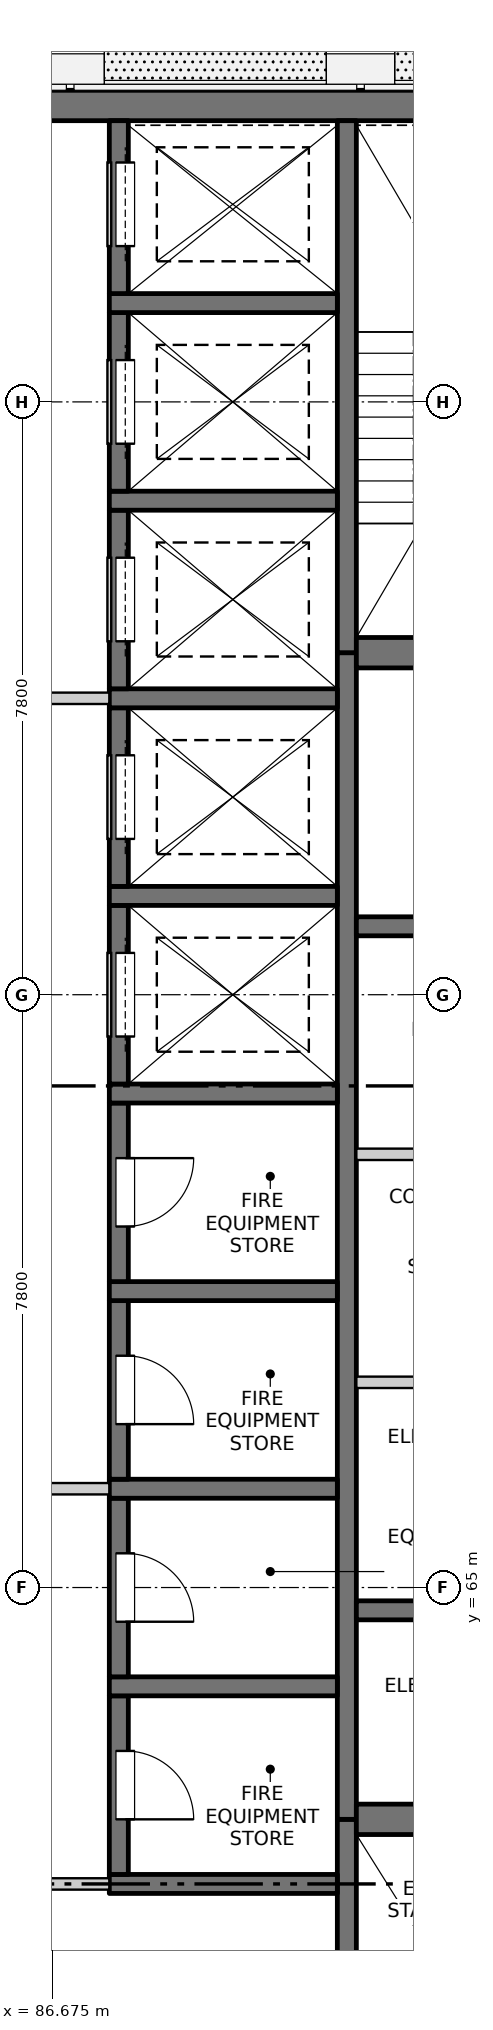
"""IFC4 building model, lengths in metres.
Left out: names, types, materials, properties, quantities, classifications, styles, units other than length and angle.
Written with IfcOpenShell. Run it as: python <this file> out.ifc"""

import sys

from ifc_helpers import new_model, si_unit, direction, frame, frame_2d, origin, place, context, subcontext, project, spatial, rectangle, extrude, element, fill, save


model = new_model("IFC4")
c1 = context("Model", 3, precision=1e-05, world=origin(), true_north=direction((0.0, 1.0)))
c2 = subcontext(c1, "Body", "Model", "MODEL_VIEW")
j1 = project(units=[si_unit("LENGTHUNIT", "METRE"), si_unit("PLANEANGLEUNIT", "RADIAN")], contexts=[c1])
p1 = place(None, origin())
s1 = spatial("IfcSite", under=j1, at=p1, CompositionType="ELEMENT")
p2 = place(p1, origin())
s2 = spatial("IfcBuilding", under=s1, at=p2, CompositionType="ELEMENT")
p3 = place(p2, frame((0.0, 0.0, 252.8)))
s3 = spatial("IfcBuildingStorey", under=s2, at=p3, CompositionType="ELEMENT", Elevation=252.8)
p4 = place(p3, frame((75.45, 84.5, -0.25), z_axis=(0.0, 0.0, 1.0), x_axis=(1.0, 0.0, 0.0)))
e1 = element("IfcWall", 1, at=p4, inside=s3, PredefinedType="SOLIDWALL", context=c2, shape_type="SweptSolid", body=[
    extrude(rectangle(XDim=19.1, YDim=0.4, at=frame_2d((9.55, 0.0))), origin(), (0.0, 0.0, 1.0), 3.4),
])
p5 = place(p3, frame((90.55, 55.45, -0.25), z_axis=(0.0, 0.0, 1.0), x_axis=(0.0, 1.0, 0.0)))
e2 = element("IfcWall", 2, at=p5, inside=s3, PredefinedType="SOLIDWALL", context=c2, shape_type="SweptSolid", body=[
    extrude(rectangle(XDim=6.5, YDim=0.25, at=frame_2d((3.25, 0.0))), origin(), (0.0, 0.0, 1.0), 3.4),
])
p6 = place(p5, frame((0.2, 0.0, 0.25)))
e3 = element("IfcOpeningElement", 3, at=p6, cuts=e2, PredefinedType="OPENING", context=c2, shape_type="SweptSolid", body=[
    extrude(rectangle(XDim=1.2, YDim=2.1, at=frame_2d((0.6, 1.05))), frame((0.0, 0.135, 0.0), z_axis=(0.0, -1.0, 0.0), x_axis=(1.0, 0.0, 0.0)), (0.0, 0.0, 1.0), 0.27),
])
p7 = place(p3, frame((90.55, 61.95, -0.25), z_axis=(0.0, 0.0, 1.0), x_axis=(0.0, 1.0, 0.0)))
e4 = element("IfcWall", 4, at=p7, inside=s3, PredefinedType="SOLIDWALL", context=c2, shape_type="SweptSolid", body=[
    extrude(rectangle(XDim=15.35, YDim=0.25, at=frame_2d((7.675, 0.0))), origin(), (0.0, 0.0, 1.0), 3.4),
])
p8 = place(p3, frame((90.55, 77.3, -0.25), z_axis=(0.0, 0.0, 1.0), x_axis=(0.0, 1.0, 0.0)))
e5 = element("IfcWall", 5, at=p8, inside=s3, PredefinedType="SOLIDWALL", context=c2, shape_type="SweptSolid", body=[
    extrude(rectangle(XDim=7.0, YDim=0.25, at=frame_2d((3.5, 0.0))), origin(), (0.0, 0.0, 1.0), 3.4),
])
p9 = place(p3, frame((87.425, 61.1, -0.25), z_axis=(0.0, 0.0, 1.0), x_axis=(1.0, 0.0, 0.0)))
e6 = element("IfcWall", 6, at=p9, inside=s3, PredefinedType="SOLIDWALL", context=c2, shape_type="SweptSolid", body=[
    extrude(rectangle(XDim=3.0, YDim=0.25, at=frame_2d((1.5, 0.0))), origin(), (0.0, 0.0, 1.0), 3.4),
])
p10 = place(p3, frame((87.55, 61.225, -0.25), z_axis=(0.0, 0.0, 1.0), x_axis=(0.0, 1.0, 0.0)))
e7 = element("IfcWall", 7, at=p10, inside=s3, PredefinedType="SOLIDWALL", context=c2, shape_type="SweptSolid", body=[
    extrude(rectangle(XDim=2.35, YDim=0.25, at=frame_2d((1.175, 0.0))), origin(), (0.0, 0.0, 1.0), 3.4),
])
p11 = place(p10, frame((0.725, 0.0, 0.25)))
e8 = element("IfcOpeningElement", 8, at=p11, cuts=e7, PredefinedType="OPENING", context=c2, shape_type="SweptSolid", body=[
    extrude(rectangle(XDim=0.9, YDim=2.1, at=frame_2d((0.45, 1.05))), frame((0.0, 0.135, 0.0), z_axis=(0.0, -1.0, 0.0), x_axis=(1.0, 0.0, 0.0)), (0.0, 0.0, 1.0), 0.27),
])
p12 = place(p3, frame((87.425, 63.7, -0.25), z_axis=(0.0, 0.0, 1.0), x_axis=(1.0, 0.0, 0.0)))
e9 = element("IfcWall", 9, at=p12, inside=s3, PredefinedType="SOLIDWALL", context=c2, shape_type="SweptSolid", body=[
    extrude(rectangle(XDim=3.0, YDim=0.25, at=frame_2d((1.5, 0.0))), origin(), (0.0, 0.0, 1.0), 3.4),
])
p13 = place(p3, frame((87.55, 63.825, -0.25), z_axis=(0.0, 0.0, 1.0), x_axis=(0.0, 1.0, 0.0)))
e10 = element("IfcWall", 10, at=p13, inside=s3, PredefinedType="SOLIDWALL", context=c2, shape_type="SweptSolid", body=[
    extrude(rectangle(XDim=2.35, YDim=0.25, at=frame_2d((1.175, 0.0))), origin(), (0.0, 0.0, 1.0), 3.4),
])
p14 = place(p13, frame((0.725, 0.0, 0.25)))
e11 = element("IfcOpeningElement", 11, at=p14, cuts=e10, PredefinedType="OPENING", context=c2, shape_type="SweptSolid", body=[
    extrude(rectangle(XDim=0.9, YDim=2.1, at=frame_2d((0.45, 1.05))), frame((0.0, 0.135, 0.0), z_axis=(0.0, -1.0, 0.0), x_axis=(1.0, 0.0, 0.0)), (0.0, 0.0, 1.0), 0.27),
])
p15 = place(p3, frame((87.425, 66.3, -0.25), z_axis=(0.0, 0.0, 1.0), x_axis=(1.0, 0.0, 0.0)))
e12 = element("IfcWall", 12, at=p15, inside=s3, PredefinedType="SOLIDWALL", context=c2, shape_type="SweptSolid", body=[
    extrude(rectangle(XDim=3.0, YDim=0.25, at=frame_2d((1.5, 0.0))), origin(), (0.0, 0.0, 1.0), 3.4),
])
p16 = place(p3, frame((87.55, 66.425, -0.25), z_axis=(0.0, 0.0, 1.0), x_axis=(0.0, 1.0, 0.0)))
e13 = element("IfcWall", 13, at=p16, inside=s3, PredefinedType="SOLIDWALL", context=c2, shape_type="SweptSolid", body=[
    extrude(rectangle(XDim=2.35, YDim=0.25, at=frame_2d((1.175, 0.0))), origin(), (0.0, 0.0, 1.0), 3.4),
])
p17 = place(p16, frame((0.725, 0.0, 0.25)))
e14 = element("IfcOpeningElement", 14, at=p17, cuts=e13, PredefinedType="OPENING", context=c2, shape_type="SweptSolid", body=[
    extrude(rectangle(XDim=0.9, YDim=2.1, at=frame_2d((0.45, 1.05))), frame((0.0, 0.135, 0.0), z_axis=(0.0, -1.0, 0.0), x_axis=(1.0, 0.0, 0.0)), (0.0, 0.0, 1.0), 0.27),
])
p18 = place(p3, frame((87.425, 68.9, -0.25), z_axis=(0.0, 0.0, 1.0), x_axis=(1.0, 0.0, 0.0)))
e15 = element("IfcWall", 15, at=p18, inside=s3, PredefinedType="SOLIDWALL", context=c2, shape_type="SweptSolid", body=[
    extrude(rectangle(XDim=3.0, YDim=0.25, at=frame_2d((1.5, 0.0))), origin(), (0.0, 0.0, 1.0), 3.4),
])
p19 = place(p3, frame((87.55, 69.025, -0.25), z_axis=(0.0, 0.0, 1.0), x_axis=(0.0, 1.0, 0.0)))
e16 = element("IfcWall", 16, at=p19, inside=s3, PredefinedType="SOLIDWALL", context=c2, shape_type="SweptSolid", body=[
    extrude(rectangle(XDim=2.35, YDim=0.25, at=frame_2d((1.175, 0.0))), origin(), (0.0, 0.0, 1.0), 3.4),
])
p20 = place(p19, frame((0.725, 0.0, 0.25)))
e17 = element("IfcOpeningElement", 17, at=p20, cuts=e16, PredefinedType="OPENING", context=c2, shape_type="SweptSolid", body=[
    extrude(rectangle(XDim=0.9, YDim=2.1, at=frame_2d((0.45, 1.05))), frame((0.0, 0.135, 0.0), z_axis=(0.0, -1.0, 0.0), x_axis=(1.0, 0.0, 0.0)), (0.0, 0.0, 1.0), 0.27),
])
p21 = place(p3, frame((87.425, 71.5, -0.25), z_axis=(0.0, 0.0, 1.0), x_axis=(1.0, 0.0, 0.0)))
e18 = element("IfcWall", 18, at=p21, inside=s3, PredefinedType="SOLIDWALL", context=c2, shape_type="SweptSolid", body=[
    extrude(rectangle(XDim=3.0, YDim=0.25, at=frame_2d((1.5, 0.0))), origin(), (0.0, 0.0, 1.0), 3.4),
])
p22 = place(p3, frame((87.55, 71.625, -0.25), z_axis=(0.0, 0.0, 1.0), x_axis=(0.0, 1.0, 0.0)))
e19 = element("IfcWall", 19, at=p22, inside=s3, PredefinedType="SOLIDWALL", context=c2, shape_type="SweptSolid", body=[
    extrude(rectangle(XDim=2.35, YDim=0.25, at=frame_2d((1.175, 0.0))), origin(), (0.0, 0.0, 1.0), 3.4),
])
p23 = place(p22, frame((0.625, 0.0, 0.25)))
e20 = element("IfcOpeningElement", 20, at=p23, cuts=e19, PredefinedType="OPENING", context=c2, shape_type="SweptSolid", body=[
    extrude(rectangle(XDim=1.1, YDim=2.1, at=frame_2d((0.55, 1.05))), frame((0.0, 0.135, 0.0), z_axis=(0.0, -1.0, 0.0), x_axis=(1.0, 0.0, 0.0)), (0.0, 0.0, 1.0), 0.27),
])
p24 = place(p3, frame((87.425, 74.1, -0.25), z_axis=(0.0, 0.0, 1.0), x_axis=(1.0, 0.0, 0.0)))
e21 = element("IfcWall", 21, at=p24, inside=s3, PredefinedType="SOLIDWALL", context=c2, shape_type="SweptSolid", body=[
    extrude(rectangle(XDim=3.0, YDim=0.25, at=frame_2d((1.5, 0.0))), origin(), (0.0, 0.0, 1.0), 3.4),
])
p25 = place(p3, frame((87.55, 74.225, -0.25), z_axis=(0.0, 0.0, 1.0), x_axis=(0.0, 1.0, 0.0)))
e22 = element("IfcWall", 22, at=p25, inside=s3, PredefinedType="SOLIDWALL", context=c2, shape_type="SweptSolid", body=[
    extrude(rectangle(XDim=2.35, YDim=0.25, at=frame_2d((1.175, 0.0))), origin(), (0.0, 0.0, 1.0), 3.4),
])
p26 = place(p25, frame((0.625, 0.0, 0.25)))
e23 = element("IfcOpeningElement", 23, at=p26, cuts=e22, PredefinedType="OPENING", context=c2, shape_type="SweptSolid", body=[
    extrude(rectangle(XDim=1.1, YDim=2.1, at=frame_2d((0.55, 1.05))), frame((0.0, 0.135, 0.0), z_axis=(0.0, -1.0, 0.0), x_axis=(1.0, 0.0, 0.0)), (0.0, 0.0, 1.0), 0.27),
])
p27 = place(p3, frame((87.425, 76.7, -0.25), z_axis=(0.0, 0.0, 1.0), x_axis=(1.0, 0.0, 0.0)))
e24 = element("IfcWall", 24, at=p27, inside=s3, PredefinedType="SOLIDWALL", context=c2, shape_type="SweptSolid", body=[
    extrude(rectangle(XDim=3.0, YDim=0.25, at=frame_2d((1.5, 0.0))), origin(), (0.0, 0.0, 1.0), 3.4),
])
p28 = place(p3, frame((87.55, 76.825, -0.25), z_axis=(0.0, 0.0, 1.0), x_axis=(0.0, 1.0, 0.0)))
e25 = element("IfcWall", 25, at=p28, inside=s3, PredefinedType="SOLIDWALL", context=c2, shape_type="SweptSolid", body=[
    extrude(rectangle(XDim=2.35, YDim=0.25, at=frame_2d((1.175, 0.0))), origin(), (0.0, 0.0, 1.0), 3.4),
])
p29 = place(p28, frame((0.625, 0.0, 0.25)))
e26 = element("IfcOpeningElement", 26, at=p29, cuts=e25, PredefinedType="OPENING", context=c2, shape_type="SweptSolid", body=[
    extrude(rectangle(XDim=1.1, YDim=2.1, at=frame_2d((0.55, 1.05))), frame((0.0, 0.135, 0.0), z_axis=(0.0, -1.0, 0.0), x_axis=(1.0, 0.0, 0.0)), (0.0, 0.0, 1.0), 0.27),
])
p30 = place(p3, frame((87.425, 79.3, -0.25), z_axis=(0.0, 0.0, 1.0), x_axis=(1.0, 0.0, 0.0)))
e27 = element("IfcWall", 27, at=p30, inside=s3, PredefinedType="SOLIDWALL", context=c2, shape_type="SweptSolid", body=[
    extrude(rectangle(XDim=3.0, YDim=0.25, at=frame_2d((1.5, 0.0))), origin(), (0.0, 0.0, 1.0), 3.4),
])
p31 = place(p3, frame((87.55, 79.425, -0.25), z_axis=(0.0, 0.0, 1.0), x_axis=(0.0, 1.0, 0.0)))
e28 = element("IfcWall", 28, at=p31, inside=s3, PredefinedType="SOLIDWALL", context=c2, shape_type="SweptSolid", body=[
    extrude(rectangle(XDim=2.35, YDim=0.25, at=frame_2d((1.175, 0.0))), origin(), (0.0, 0.0, 1.0), 3.4),
])
p32 = place(p31, frame((0.625, 0.0, 0.25)))
e29 = element("IfcOpeningElement", 29, at=p32, cuts=e28, PredefinedType="OPENING", context=c2, shape_type="SweptSolid", body=[
    extrude(rectangle(XDim=1.1, YDim=2.1, at=frame_2d((0.55, 1.05))), frame((0.0, 0.135, 0.0), z_axis=(0.0, -1.0, 0.0), x_axis=(1.0, 0.0, 0.0)), (0.0, 0.0, 1.0), 0.27),
])
p33 = place(p3, frame((87.425, 81.9, -0.25), z_axis=(0.0, 0.0, 1.0), x_axis=(1.0, 0.0, 0.0)))
e30 = element("IfcWall", 30, at=p33, inside=s3, PredefinedType="SOLIDWALL", context=c2, shape_type="SweptSolid", body=[
    extrude(rectangle(XDim=3.0, YDim=0.25, at=frame_2d((1.5, 0.0))), origin(), (0.0, 0.0, 1.0), 3.4),
])
p34 = place(p3, frame((87.55, 82.025, -0.25), z_axis=(0.0, 0.0, 1.0), x_axis=(0.0, 1.0, 0.0)))
e31 = element("IfcWall", 31, at=p34, inside=s3, PredefinedType="SOLIDWALL", context=c2, shape_type="SweptSolid", body=[
    extrude(rectangle(XDim=2.275, YDim=0.25, at=frame_2d((1.138, 0.0))), origin(), (0.0, 0.0, 1.0), 3.4),
])
p35 = place(p34, frame((0.625, 0.0, 0.25)))
e32 = element("IfcOpeningElement", 32, at=p35, cuts=e31, PredefinedType="OPENING", context=c2, shape_type="SweptSolid", body=[
    extrude(rectangle(XDim=1.1, YDim=2.1, at=frame_2d((0.55, 1.05))), frame((0.0, 0.135, 0.0), z_axis=(0.0, -1.0, 0.0), x_axis=(1.0, 0.0, 0.0)), (0.0, 0.0, 1.0), 0.27),
])
p36 = place(p3, frame((90.675, 61.95, -0.25), z_axis=(0.0, 0.0, 1.0), x_axis=(1.0, 0.0, 0.0)))
e33 = element("IfcWall", 33, at=p36, inside=s3, PredefinedType="SOLIDWALL", context=c2, shape_type="SweptSolid", body=[
    extrude(rectangle(XDim=3.875, YDim=0.4, at=frame_2d((1.938, 0.0))), origin(), (0.0, 0.0, 1.0), 3.4),
])
for number, where, z_axis, x_axis in (
    (34, (90.675, 64.7, -0.25), (0.0, 0.0, 1.0), (1.0, 0.0, 0.0)),
    (35, (90.675, 73.7, -0.25), (0.0, 0.0, 1.0), (1.0, 0.0, 0.0)),
):
    element("IfcWall", number, at=place(p3, frame(where, z_axis=z_axis, x_axis=x_axis)), inside=s3, PredefinedType="SOLIDWALL", context=c2, shape_type="SweptSolid", body=[
        extrude(rectangle(XDim=3.875, YDim=0.25, at=frame_2d((1.938, 0.0))), origin(), (0.0, 0.0, 1.0), 3.4),
    ])
p37 = place(p3, frame((90.675, 77.3, -0.25), z_axis=(0.0, 0.0, 1.0), x_axis=(1.0, 0.0, 0.0)))
e36 = element("IfcWall", 36, at=p37, inside=s3, PredefinedType="SOLIDWALL", context=c2, shape_type="SweptSolid", body=[
    extrude(rectangle(XDim=3.875, YDim=0.4, at=frame_2d((1.938, 0.0))), origin(), (0.0, 0.0, 1.0), 3.4),
])
p38 = place(p3, frame((82.575, 61.1, 0.0), z_axis=(0.0, 0.0, 1.0), x_axis=(1.0, 0.0, 0.0)))
e37 = element("IfcWall", 37, at=p38, inside=s3, PredefinedType="PARTITIONING", context=c2, shape_type="SweptSolid", body=[
    extrude(rectangle(XDim=4.85, YDim=0.15, at=frame_2d((2.425, 0.0))), origin(), (0.0, 0.0, 1.0), 3.15),
])
p39 = place(p38, frame((1.525, 0.0, 0.0)))
e38 = element("IfcOpeningElement", 38, at=p39, cuts=e37, PredefinedType="OPENING", context=c2, shape_type="SweptSolid", body=[
    extrude(rectangle(XDim=1.8, YDim=2.1, at=frame_2d((0.9, 1.05))), frame((0.0, 0.085, 0.0), z_axis=(0.0, -1.0, 0.0), x_axis=(1.0, 0.0, 0.0)), (0.0, 0.0, 1.0), 0.17),
])
p40 = place(p3, frame((82.575, 66.3, 0.0), z_axis=(0.0, 0.0, 1.0), x_axis=(1.0, 0.0, 0.0)))
e39 = element("IfcWall", 39, at=p40, inside=s3, PredefinedType="PARTITIONING", context=c2, shape_type="SweptSolid", body=[
    extrude(rectangle(XDim=4.85, YDim=0.15, at=frame_2d((2.425, 0.0))), origin(), (0.0, 0.0, 1.0), 3.15),
])
p41 = place(p40, frame((1.525, 0.0, 0.0)))
e40 = element("IfcOpeningElement", 40, at=p41, cuts=e39, PredefinedType="OPENING", context=c2, shape_type="SweptSolid", body=[
    extrude(rectangle(XDim=1.8, YDim=2.1, at=frame_2d((0.9, 1.05))), frame((0.0, 0.085, 0.0), z_axis=(0.0, -1.0, 0.0), x_axis=(1.0, 0.0, 0.0)), (0.0, 0.0, 1.0), 0.17),
])
for number, where, z_axis, x_axis in (
    (41, (90.675, 67.7, 0.0), (0.0, 0.0, 1.0), (1.0, 0.0, 0.0)),
    (42, (90.675, 70.7, 0.0), (0.0, 0.0, 1.0), (1.0, 0.0, 0.0)),
):
    element("IfcWall", number, at=place(p3, frame(where, z_axis=z_axis, x_axis=x_axis)), inside=s3, PredefinedType="PARTITIONING", context=c2, shape_type="SweptSolid", body=[
        extrude(rectangle(XDim=3.875, YDim=0.15, at=frame_2d((1.938, 0.0))), origin(), (0.0, 0.0, 1.0), 3.15),
    ])
p42 = place(p3, frame((82.575, 76.7, 0.0), z_axis=(0.0, 0.0, 1.0), x_axis=(1.0, 0.0, 0.0)))
e43 = element("IfcWall", 43, at=p42, inside=s3, PredefinedType="PARTITIONING", context=c2, shape_type="SweptSolid", body=[
    extrude(rectangle(XDim=4.85, YDim=0.15, at=frame_2d((2.425, 0.0))), origin(), (0.0, 0.0, 1.0), 3.15),
])
p43 = place(p42, frame((1.525, 0.0, 0.0)))
e44 = element("IfcOpeningElement", 44, at=p43, cuts=e43, PredefinedType="OPENING", context=c2, shape_type="SweptSolid", body=[
    extrude(rectangle(XDim=1.8, YDim=2.1, at=frame_2d((0.9, 1.05))), frame((0.0, 0.085, 0.0), z_axis=(0.0, -1.0, 0.0), x_axis=(1.0, 0.0, 0.0)), (0.0, 0.0, 1.0), 0.17),
])
p44 = place(p11, origin())
e45 = element("IfcDoor", 45, at=p44, inside=s3, OperationType="SINGLE_SWING_RIGHT", PredefinedType="DOOR", context=c2, shape_type="SweptSolid", body=[
    extrude(rectangle(XDim=0.9, YDim=2.1, at=frame_2d((0.45, 1.05))), frame((0.0, -0.06, 0.0), z_axis=(0.0, -1.0, 0.0), x_axis=(1.0, 0.0, 0.0)), (0.0, 0.0, 1.0), 0.05),
])
fill(e8, e45)
p45 = place(p14, origin())
e46 = element("IfcDoor", 46, at=p45, inside=s3, OperationType="SINGLE_SWING_RIGHT", PredefinedType="DOOR", context=c2, shape_type="SweptSolid", body=[
    extrude(rectangle(XDim=0.9, YDim=2.1, at=frame_2d((0.45, 1.05))), frame((0.0, -0.06, 0.0), z_axis=(0.0, -1.0, 0.0), x_axis=(1.0, 0.0, 0.0)), (0.0, 0.0, 1.0), 0.05),
])
fill(e11, e46)
p46 = place(p17, origin())
e47 = element("IfcDoor", 47, at=p46, inside=s3, OperationType="SINGLE_SWING_RIGHT", PredefinedType="DOOR", context=c2, shape_type="SweptSolid", body=[
    extrude(rectangle(XDim=0.9, YDim=2.1, at=frame_2d((0.45, 1.05))), frame((0.0, -0.06, 0.0), z_axis=(0.0, -1.0, 0.0), x_axis=(1.0, 0.0, 0.0)), (0.0, 0.0, 1.0), 0.05),
])
fill(e14, e47)
p47 = place(p20, origin())
e48 = element("IfcDoor", 48, at=p47, inside=s3, OperationType="SINGLE_SWING_LEFT", PredefinedType="DOOR", context=c2, shape_type="SweptSolid", body=[
    extrude(rectangle(XDim=0.9, YDim=2.1, at=frame_2d((0.45, 1.05))), frame((0.0, -0.06, 0.0), z_axis=(0.0, -1.0, 0.0), x_axis=(1.0, 0.0, 0.0)), (0.0, 0.0, 1.0), 0.05),
])
fill(e17, e48)
p48 = place(p23, origin())
e49 = element("IfcDoor", 49, at=p48, inside=s3, OperationType="SLIDING_TO_LEFT", PredefinedType="DOOR", context=c2, shape_type="SweptSolid", body=[
    extrude(rectangle(XDim=1.1, YDim=2.1, at=frame_2d((0.55, 1.05))), frame((0.0, -0.06, 0.0), z_axis=(0.0, -1.0, 0.0), x_axis=(1.0, 0.0, 0.0)), (0.0, 0.0, 1.0), 0.05),
])
fill(e20, e49)
p49 = place(p26, origin())
e50 = element("IfcDoor", 50, at=p49, inside=s3, OperationType="SLIDING_TO_LEFT", PredefinedType="DOOR", context=c2, shape_type="SweptSolid", body=[
    extrude(rectangle(XDim=1.1, YDim=2.1, at=frame_2d((0.55, 1.05))), frame((0.0, -0.06, 0.0), z_axis=(0.0, -1.0, 0.0), x_axis=(1.0, 0.0, 0.0)), (0.0, 0.0, 1.0), 0.05),
])
fill(e23, e50)
p50 = place(p29, origin())
e51 = element("IfcDoor", 51, at=p50, inside=s3, OperationType="SLIDING_TO_LEFT", PredefinedType="DOOR", context=c2, shape_type="SweptSolid", body=[
    extrude(rectangle(XDim=1.1, YDim=2.1, at=frame_2d((0.55, 1.05))), frame((0.0, -0.06, 0.0), z_axis=(0.0, -1.0, 0.0), x_axis=(1.0, 0.0, 0.0)), (0.0, 0.0, 1.0), 0.05),
])
fill(e26, e51)
p51 = place(p32, origin())
e52 = element("IfcDoor", 52, at=p51, inside=s3, OperationType="SLIDING_TO_RIGHT", PredefinedType="DOOR", context=c2, shape_type="SweptSolid", body=[
    extrude(rectangle(XDim=1.1, YDim=2.1, at=frame_2d((0.55, 1.05))), frame((0.0, -0.06, 0.0), z_axis=(0.0, -1.0, 0.0), x_axis=(1.0, 0.0, 0.0)), (0.0, 0.0, 1.0), 0.05),
])
fill(e29, e52)
p52 = place(p35, origin())
e53 = element("IfcDoor", 53, at=p52, inside=s3, OperationType="SLIDING_TO_RIGHT", PredefinedType="DOOR", context=c2, shape_type="SweptSolid", body=[
    extrude(rectangle(XDim=1.1, YDim=2.1, at=frame_2d((0.55, 1.05))), frame((0.0, -0.06, 0.0), z_axis=(0.0, -1.0, 0.0), x_axis=(1.0, 0.0, 0.0)), (0.0, 0.0, 1.0), 0.05),
])
fill(e32, e53)
save(model, sys.argv[1])
